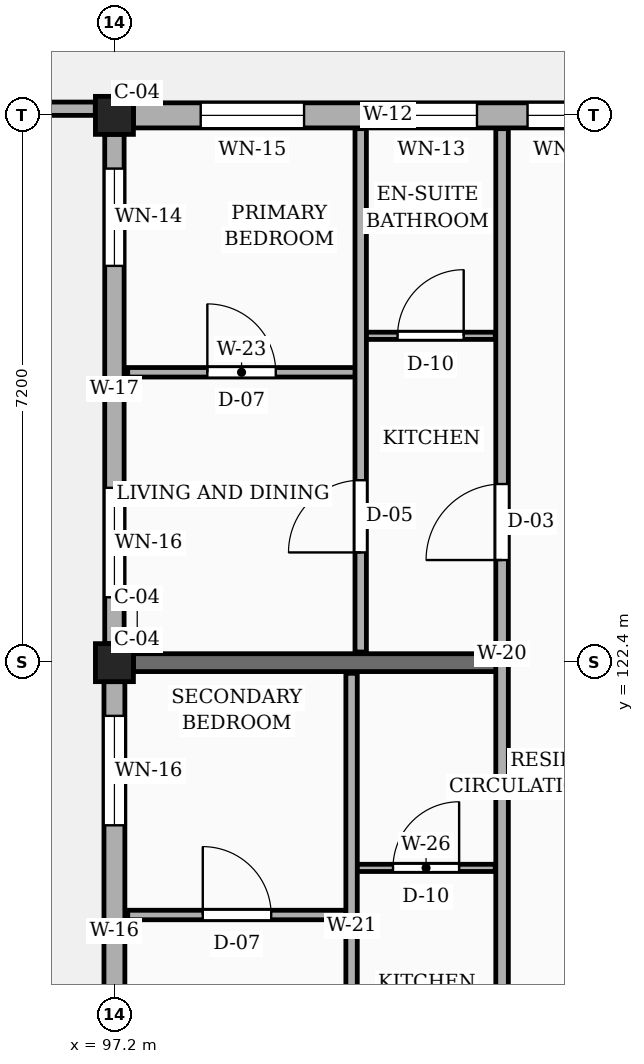
"""IFC4 building model, lengths in metres.
Left out: names, types, materials, properties, quantities, classifications, styles, units other than length and angle.
Written with IfcOpenShell. Run it as: python <this file> out.ifc"""

import sys

from ifc_helpers import new_model, si_unit, direction, frame, frame_2d, origin, origin_2d, place, context, subcontext, project, spatial, rectangle, extrude, element, fill, save


model = new_model("IFC4")
c1 = context("Model", 3, precision=1e-05, world=origin(), true_north=direction((0.0, 1.0)))
c2 = subcontext(c1, "Body", "Model", "MODEL_VIEW")
j1 = project(units=[si_unit("LENGTHUNIT", "METRE"), si_unit("PLANEANGLEUNIT", "RADIAN")], contexts=[c1])
p1 = place(None, origin())
s1 = spatial("IfcSite", under=j1, at=p1, CompositionType="ELEMENT")
p2 = place(p1, origin())
s2 = spatial("IfcBuilding", under=s1, at=p2, CompositionType="ELEMENT")
p3 = place(p2, frame((0.0, 0.0, 23.4)))
s3 = spatial("IfcBuildingStorey", under=s2, at=p3, CompositionType="ELEMENT", Elevation=23.4)
for number, where, z_axis, x_axis in (
    (1, (97.2, 122.4, 0.0), (0.0, 0.0, 1.0), (1.0, 0.0, 0.0)),
    (2, (97.2, 129.6, 0.0), (0.0, 0.0, 1.0), (1.0, 0.0, 0.0)),
):
    element("IfcColumn", number, at=place(p3, frame(where, z_axis=z_axis, x_axis=x_axis)), inside=s3, PredefinedType="COLUMN", context=c2, shape_type="SweptSolid", body=[
        extrude(rectangle(XDim=0.5, YDim=0.5, at=origin_2d()), origin(), (0.0, 0.0, 1.0), 3.15),
    ])
p4 = place(p3, frame((97.45, 122.4, 0.0), z_axis=(0.0, 0.0, 1.0), x_axis=(1.0, 0.0, 0.0)))
e3 = element("IfcWall", 3, at=p4, inside=s3, PredefinedType="SOLIDWALL", context=c2, shape_type="SweptSolid", body=[
    extrude(rectangle(XDim=4.85, YDim=0.235, at=frame_2d((2.425, 0.0))), origin(), (0.0, 0.0, 1.0), 2.19),
])
p5 = place(p3, frame((104.15, 129.6, 0.0), z_axis=(0.0, 0.0, 1.0), x_axis=(-1.0, 0.0, 0.0)))
e4 = element("IfcWall", 4, at=p5, inside=s3, PredefinedType="SOLIDWALL", context=c2, shape_type="SweptSolid", body=[
    extrude(rectangle(XDim=6.7, YDim=0.33, at=frame_2d((3.35, 0.0))), origin(), (0.0, 0.0, 1.0), 2.46),
])
p6 = place(p5, frame((0.475, 0.0, 0.78)))
e5 = element("IfcOpeningElement", 5, at=p6, cuts=e4, PredefinedType="OPENING", context=c2, shape_type="SweptSolid", body=[
    extrude(rectangle(XDim=1.04, YDim=1.26, at=frame_2d((0.52, 0.63))), frame((0.0, 0.175, 0.0), z_axis=(0.0, -1.0, 0.0), x_axis=(1.0, 0.0, 0.0)), (0.0, 0.0, 1.0), 0.35),
])
p7 = place(p5, frame((2.18, 0.0, 0.78)))
e6 = element("IfcOpeningElement", 6, at=p7, cuts=e4, PredefinedType="OPENING", context=c2, shape_type="SweptSolid", body=[
    extrude(rectangle(XDim=1.2, YDim=1.26, at=frame_2d((0.6, 0.63))), frame((0.0, 0.175, 0.0), z_axis=(0.0, -1.0, 0.0), x_axis=(1.0, 0.0, 0.0)), (0.0, 0.0, 1.0), 0.35),
])
p8 = place(p5, frame((4.455, 0.0, 0.78)))
e7 = element("IfcOpeningElement", 7, at=p8, cuts=e4, PredefinedType="OPENING", context=c2, shape_type="SweptSolid", body=[
    extrude(rectangle(XDim=1.36, YDim=1.26, at=frame_2d((0.68, 0.63))), frame((0.0, 0.175, 0.0), z_axis=(0.0, -1.0, 0.0), x_axis=(1.0, 0.0, 0.0)), (0.0, 0.0, 1.0), 0.35),
])
p9 = place(p3, frame((97.2, 129.35, 0.0), z_axis=(0.0, 0.0, 1.0), x_axis=(0.0, -1.0, 0.0)))
e8 = element("IfcWall", 8, at=p9, inside=s3, PredefinedType="SOLIDWALL", context=c2, shape_type="SweptSolid", body=[
    extrude(rectangle(XDim=6.7, YDim=0.255, at=frame_2d((3.35, 0.0))), origin(), (0.0, 0.0, 1.0), 2.46),
])
p10 = place(p9, frame((0.45, 0.0, 0.78)))
e9 = element("IfcOpeningElement", 9, at=p10, cuts=e8, PredefinedType="OPENING", context=c2, shape_type="SweptSolid", body=[
    extrude(rectangle(XDim=1.28, YDim=1.26, at=frame_2d((0.64, 0.63))), frame((0.0, 0.137, 0.0), z_axis=(0.0, -1.0, 0.0), x_axis=(1.0, 0.0, 0.0)), (0.0, 0.0, 1.0), 0.275),
])
p11 = place(p9, frame((4.65, 0.0, 0.78)))
e10 = element("IfcOpeningElement", 10, at=p11, cuts=e8, PredefinedType="OPENING", context=c2, shape_type="SweptSolid", body=[
    extrude(rectangle(XDim=1.44, YDim=1.26, at=frame_2d((0.72, 0.63))), frame((0.0, 0.137, 0.0), z_axis=(0.0, -1.0, 0.0), x_axis=(1.0, 0.0, 0.0)), (0.0, 0.0, 1.0), 0.275),
])
p12 = place(p3, frame((97.2, 122.15, 0.0), z_axis=(0.0, 0.0, 1.0), x_axis=(0.0, -1.0, 0.0)))
e11 = element("IfcWall", 11, at=p12, inside=s3, PredefinedType="SOLIDWALL", context=c2, shape_type="SweptSolid", body=[
    extrude(rectangle(XDim=6.7, YDim=0.275, at=frame_2d((3.35, 0.0))), origin(), (0.0, 0.0, 1.0), 2.46),
])
p13 = place(p12, frame((0.45, 0.0, 0.78)))
e12 = element("IfcOpeningElement", 12, at=p13, cuts=e11, PredefinedType="OPENING", context=c2, shape_type="SweptSolid", body=[
    extrude(rectangle(XDim=1.44, YDim=1.26, at=frame_2d((0.72, 0.63))), frame((0.0, 0.147, 0.0), z_axis=(0.0, -1.0, 0.0), x_axis=(1.0, 0.0, 0.0)), (0.0, 0.0, 1.0), 0.295),
])
p14 = place(p12, frame((4.65, 0.0, 0.78)))
e13 = element("IfcOpeningElement", 13, at=p14, cuts=e11, PredefinedType="OPENING", context=c2, shape_type="SweptSolid", body=[
    extrude(rectangle(XDim=0.98, YDim=1.36, at=frame_2d((0.49, 0.68))), frame((0.0, 0.147, 0.0), z_axis=(0.0, -1.0, 0.0), x_axis=(1.0, 0.0, 0.0)), (0.0, 0.0, 1.0), 0.295),
])
p15 = place(p3, frame((90.175, 129.688, 0.0), z_axis=(0.0, 0.0, 1.0), x_axis=(1.0, 0.0, 0.0)))
e14 = element("IfcWall", 14, at=p15, inside=s3, PredefinedType="PARAPET", context=c2, shape_type="SweptSolid", body=[
    extrude(rectangle(XDim=6.773, YDim=0.175, at=frame_2d((3.386, 0.0))), origin(), (0.0, 0.0, 1.0), 1.1),
])
p16 = place(p3, frame((102.3, 115.22, 0.0), z_axis=(0.0, 0.0, 1.0), x_axis=(0.0, 1.0, 0.0)))
e15 = element("IfcWall", 15, at=p16, inside=s3, PredefinedType="PARTITIONING", context=c2, shape_type="SweptSolid", body=[
    extrude(rectangle(XDim=7.16, YDim=0.165, at=frame_2d((3.58, 0.0))), origin(), (0.0, 0.0, 1.0), 2.325),
])
p17 = place(p16, frame((1.33, 0.0, 0.0)))
e16 = element("IfcOpeningElement", 16, at=p17, cuts=e15, PredefinedType="OPENING", context=c2, shape_type="SweptSolid", body=[
    extrude(rectangle(XDim=1.14, YDim=2.18, at=frame_2d((0.57, 1.09))), frame((0.0, 0.093, 0.0), z_axis=(0.0, -1.0, 0.0), x_axis=(1.0, 0.0, 0.0)), (0.0, 0.0, 1.0), 0.185),
])
p18 = place(p3, frame((102.3, 122.42, 0.0), z_axis=(0.0, 0.0, 1.0), x_axis=(0.0, 1.0, 0.0)))
e17 = element("IfcWall", 17, at=p18, inside=s3, PredefinedType="PARTITIONING", context=c2, shape_type="SweptSolid", body=[
    extrude(rectangle(XDim=7.005, YDim=0.165, at=frame_2d((3.502, 0.0))), origin(), (0.0, 0.0, 1.0), 2.325),
])
p19 = place(p18, frame((1.33, 0.0, 0.0)))
e18 = element("IfcOpeningElement", 18, at=p19, cuts=e17, PredefinedType="OPENING", context=c2, shape_type="SweptSolid", body=[
    extrude(rectangle(XDim=1.0, YDim=2.15, at=frame_2d((0.5, 1.075))), frame((0.0, 0.093, 0.0), z_axis=(0.0, -1.0, 0.0), x_axis=(1.0, 0.0, 0.0)), (0.0, 0.0, 1.0), 0.185),
])
p20 = place(p3, frame((97.375, 119.08, 0.0), z_axis=(0.0, 0.0, 1.0), x_axis=(1.0, 0.0, 0.0)))
e19 = element("IfcWall", 19, at=p20, inside=s3, PredefinedType="PARTITIONING", context=c2, shape_type="SweptSolid", body=[
    extrude(rectangle(XDim=2.875, YDim=0.125, at=frame_2d((1.438, 0.0))), origin(), (0.0, 0.0, 1.0), 2.325),
])
p21 = place(p20, frame((0.988, 0.0, 0.0)))
e20 = element("IfcOpeningElement", 20, at=p21, cuts=e19, PredefinedType="OPENING", context=c2, shape_type="SweptSolid", body=[
    extrude(rectangle(XDim=0.9, YDim=2.1, at=frame_2d((0.45, 1.05))), frame((0.0, 0.073, 0.0), z_axis=(0.0, -1.0, 0.0), x_axis=(1.0, 0.0, 0.0)), (0.0, 0.0, 1.0), 0.145),
])
p22 = place(p3, frame((100.39, 119.7, 0.0), z_axis=(0.0, 0.0, 1.0), x_axis=(1.0, 0.0, 0.0)))
e21 = element("IfcWall", 21, at=p22, inside=s3, PredefinedType="PARTITIONING", context=c2, shape_type="SweptSolid", body=[
    extrude(rectangle(XDim=1.82, YDim=0.095, at=frame_2d((0.91, 0.0))), origin(), (0.0, 0.0, 1.0), 2.325),
])
p23 = place(p22, frame((0.475, 0.0, 0.0)))
e22 = element("IfcOpeningElement", 22, at=p23, cuts=e21, PredefinedType="OPENING", context=c2, shape_type="SweptSolid", body=[
    extrude(rectangle(XDim=0.87, YDim=2.05, at=frame_2d((0.435, 1.025))), frame((0.0, 0.058, 0.0), z_axis=(0.0, -1.0, 0.0), x_axis=(1.0, 0.0, 0.0)), (0.0, 0.0, 1.0), 0.115),
])
p24 = place(p3, frame((100.32, 115.34, 0.0), z_axis=(0.0, 0.0, 1.0), x_axis=(0.0, 1.0, 0.0)))
e23 = element("IfcWall", 23, at=p24, inside=s3, PredefinedType="PARTITIONING", context=c2, shape_type="SweptSolid", body=[
    extrude(rectangle(XDim=6.92, YDim=0.15, at=frame_2d((3.46, 0.0))), origin(), (0.0, 0.0, 1.0), 2.325),
])
p25 = place(p24, frame((1.31, 0.0, 0.0)))
e24 = element("IfcOpeningElement", 24, at=p25, cuts=e23, PredefinedType="OPENING", context=c2, shape_type="SweptSolid", body=[
    extrude(rectangle(XDim=0.95, YDim=2.1, at=frame_2d((0.475, 1.05))), frame((0.0, 0.085, 0.0), z_axis=(0.0, -1.0, 0.0), x_axis=(1.0, 0.0, 0.0)), (0.0, 0.0, 1.0), 0.17),
])
p26 = place(p3, frame((97.375, 126.22, 0.0), z_axis=(0.0, 0.0, 1.0), x_axis=(1.0, 0.0, 0.0)))
e25 = element("IfcWall", 25, at=p26, inside=s3, PredefinedType="PARTITIONING", context=c2, shape_type="SweptSolid", body=[
    extrude(rectangle(XDim=2.995, YDim=0.125, at=frame_2d((1.498, 0.0))), origin(), (0.0, 0.0, 1.0), 2.325),
])
p27 = place(p26, frame((1.048, 0.0, 0.0)))
e26 = element("IfcOpeningElement", 26, at=p27, cuts=e25, PredefinedType="OPENING", context=c2, shape_type="SweptSolid", body=[
    extrude(rectangle(XDim=0.9, YDim=2.1, at=frame_2d((0.45, 1.05))), frame((0.0, 0.073, 0.0), z_axis=(0.0, -1.0, 0.0), x_axis=(1.0, 0.0, 0.0)), (0.0, 0.0, 1.0), 0.145),
])
p28 = place(p3, frame((100.51, 126.7, 0.0), z_axis=(0.0, 0.0, 1.0), x_axis=(1.0, 0.0, 0.0)))
e27 = element("IfcWall", 27, at=p28, inside=s3, PredefinedType="PARTITIONING", context=c2, shape_type="SweptSolid", body=[
    extrude(rectangle(XDim=1.7, YDim=0.095, at=frame_2d((0.85, 0.0))), origin(), (0.0, 0.0, 1.0), 2.325),
])
p29 = place(p28, frame((0.415, 0.0, 0.0)))
e28 = element("IfcOpeningElement", 28, at=p29, cuts=e27, PredefinedType="OPENING", context=c2, shape_type="SweptSolid", body=[
    extrude(rectangle(XDim=0.87, YDim=2.05, at=frame_2d((0.435, 1.025))), frame((0.0, 0.058, 0.0), z_axis=(0.0, -1.0, 0.0), x_axis=(1.0, 0.0, 0.0)), (0.0, 0.0, 1.0), 0.115),
])
p30 = place(p3, frame((100.44, 122.54, 0.0), z_axis=(0.0, 0.0, 1.0), x_axis=(0.0, 1.0, 0.0)))
e29 = element("IfcWall", 29, at=p30, inside=s3, PredefinedType="PARTITIONING", context=c2, shape_type="SweptSolid", body=[
    extrude(rectangle(XDim=6.885, YDim=0.15, at=frame_2d((3.442, 0.0))), origin(), (0.0, 0.0, 1.0), 2.325),
])
p31 = place(p30, frame((1.31, 0.0, 0.0)))
e30 = element("IfcOpeningElement", 30, at=p31, cuts=e29, PredefinedType="OPENING", context=c2, shape_type="SweptSolid", body=[
    extrude(rectangle(XDim=0.95, YDim=2.1, at=frame_2d((0.475, 1.05))), frame((0.0, 0.085, 0.0), z_axis=(0.0, -1.0, 0.0), x_axis=(1.0, 0.0, 0.0)), (0.0, 0.0, 1.0), 0.17),
])
p32 = place(p6, origin())
e31 = element("IfcWindow", 31, at=p32, inside=s3, PartitioningType="SINGLE_PANEL", PredefinedType="WINDOW", context=c2, shape_type="SweptSolid", body=[
    extrude(rectangle(XDim=1.04, YDim=1.26, at=frame_2d((0.52, 0.63))), frame((0.0, 0.03, 0.0), z_axis=(0.0, -1.0, 0.0), x_axis=(1.0, 0.0, 0.0)), (0.0, 0.0, 1.0), 0.06),
])
fill(e5, e31)
p33 = place(p7, origin())
e32 = element("IfcWindow", 32, at=p33, inside=s3, PartitioningType="SINGLE_PANEL", PredefinedType="WINDOW", context=c2, shape_type="SweptSolid", body=[
    extrude(rectangle(XDim=1.2, YDim=1.26, at=frame_2d((0.6, 0.63))), frame((0.0, 0.03, 0.0), z_axis=(0.0, -1.0, 0.0), x_axis=(1.0, 0.0, 0.0)), (0.0, 0.0, 1.0), 0.06),
])
fill(e6, e32)
p34 = place(p8, origin())
e33 = element("IfcWindow", 33, at=p34, inside=s3, PartitioningType="SINGLE_PANEL", PredefinedType="WINDOW", context=c2, shape_type="SweptSolid", body=[
    extrude(rectangle(XDim=1.36, YDim=1.26, at=frame_2d((0.68, 0.63))), frame((0.0, 0.03, 0.0), z_axis=(0.0, -1.0, 0.0), x_axis=(1.0, 0.0, 0.0)), (0.0, 0.0, 1.0), 0.06),
])
fill(e7, e33)
p35 = place(p10, origin())
e34 = element("IfcWindow", 34, at=p35, inside=s3, PartitioningType="SINGLE_PANEL", PredefinedType="WINDOW", context=c2, shape_type="SweptSolid", body=[
    extrude(rectangle(XDim=1.28, YDim=1.26, at=frame_2d((0.64, 0.63))), frame((0.0, 0.03, 0.0), z_axis=(0.0, -1.0, 0.0), x_axis=(1.0, 0.0, 0.0)), (0.0, 0.0, 1.0), 0.06),
])
fill(e9, e34)
p36 = place(p11, origin())
e35 = element("IfcWindow", 35, at=p36, inside=s3, PartitioningType="SINGLE_PANEL", PredefinedType="WINDOW", context=c2, shape_type="SweptSolid", body=[
    extrude(rectangle(XDim=1.44, YDim=1.26, at=frame_2d((0.72, 0.63))), frame((0.0, 0.03, 0.0), z_axis=(0.0, -1.0, 0.0), x_axis=(1.0, 0.0, 0.0)), (0.0, 0.0, 1.0), 0.06),
])
fill(e10, e35)
p37 = place(p13, origin())
e36 = element("IfcWindow", 36, at=p37, inside=s3, PartitioningType="SINGLE_PANEL", PredefinedType="WINDOW", context=c2, shape_type="SweptSolid", body=[
    extrude(rectangle(XDim=1.44, YDim=1.26, at=frame_2d((0.72, 0.63))), frame((0.0, 0.03, 0.0), z_axis=(0.0, -1.0, 0.0), x_axis=(1.0, 0.0, 0.0)), (0.0, 0.0, 1.0), 0.06),
])
fill(e12, e36)
p38 = place(p19, origin())
e37 = element("IfcDoor", 37, at=p38, inside=s3, OperationType="SINGLE_SWING_LEFT", PredefinedType="DOOR", context=c2, shape_type="SweptSolid", body=[
    extrude(rectangle(XDim=1.0, YDim=2.15, at=frame_2d((0.5, 1.075))), frame((0.0, 0.025, 0.0), z_axis=(0.0, -1.0, 0.0), x_axis=(1.0, 0.0, 0.0)), (0.0, 0.0, 1.0), 0.05),
])
fill(e18, e37)
p39 = place(p21, origin())
e38 = element("IfcDoor", 38, at=p39, inside=s3, OperationType="SINGLE_SWING_LEFT", PredefinedType="DOOR", context=c2, shape_type="SweptSolid", body=[
    extrude(rectangle(XDim=0.9, YDim=2.1, at=frame_2d((0.45, 1.05))), frame((0.0, 0.025, 0.0), z_axis=(0.0, -1.0, 0.0), x_axis=(1.0, 0.0, 0.0)), (0.0, 0.0, 1.0), 0.05),
])
fill(e20, e38)
p40 = place(p23, origin())
e39 = element("IfcDoor", 39, at=p40, inside=s3, OperationType="SINGLE_SWING_RIGHT", PredefinedType="DOOR", context=c2, shape_type="SweptSolid", body=[
    extrude(rectangle(XDim=0.87, YDim=2.05, at=frame_2d((0.435, 1.025))), frame((0.0, 0.025, 0.0), z_axis=(0.0, -1.0, 0.0), x_axis=(1.0, 0.0, 0.0)), (0.0, 0.0, 1.0), 0.05),
])
fill(e22, e39)
p41 = place(p27, origin())
e40 = element("IfcDoor", 40, at=p41, inside=s3, OperationType="SINGLE_SWING_LEFT", PredefinedType="DOOR", context=c2, shape_type="SweptSolid", body=[
    extrude(rectangle(XDim=0.9, YDim=2.1, at=frame_2d((0.45, 1.05))), frame((0.0, 0.025, 0.0), z_axis=(0.0, -1.0, 0.0), x_axis=(1.0, 0.0, 0.0)), (0.0, 0.0, 1.0), 0.05),
])
fill(e26, e40)
p42 = place(p29, origin())
e41 = element("IfcDoor", 41, at=p42, inside=s3, OperationType="SINGLE_SWING_RIGHT", PredefinedType="DOOR", context=c2, shape_type="SweptSolid", body=[
    extrude(rectangle(XDim=0.87, YDim=2.05, at=frame_2d((0.435, 1.025))), frame((0.0, 0.025, 0.0), z_axis=(0.0, -1.0, 0.0), x_axis=(1.0, 0.0, 0.0)), (0.0, 0.0, 1.0), 0.05),
])
fill(e28, e41)
p43 = place(p31, origin())
e42 = element("IfcDoor", 42, at=p43, inside=s3, OperationType="SINGLE_SWING_LEFT", PredefinedType="DOOR", context=c2, shape_type="SweptSolid", body=[
    extrude(rectangle(XDim=0.95, YDim=2.1, at=frame_2d((0.475, 1.05))), frame((0.0, 0.025, 0.0), z_axis=(0.0, -1.0, 0.0), x_axis=(1.0, 0.0, 0.0)), (0.0, 0.0, 1.0), 0.05),
])
fill(e30, e42)
save(model, sys.argv[1])
